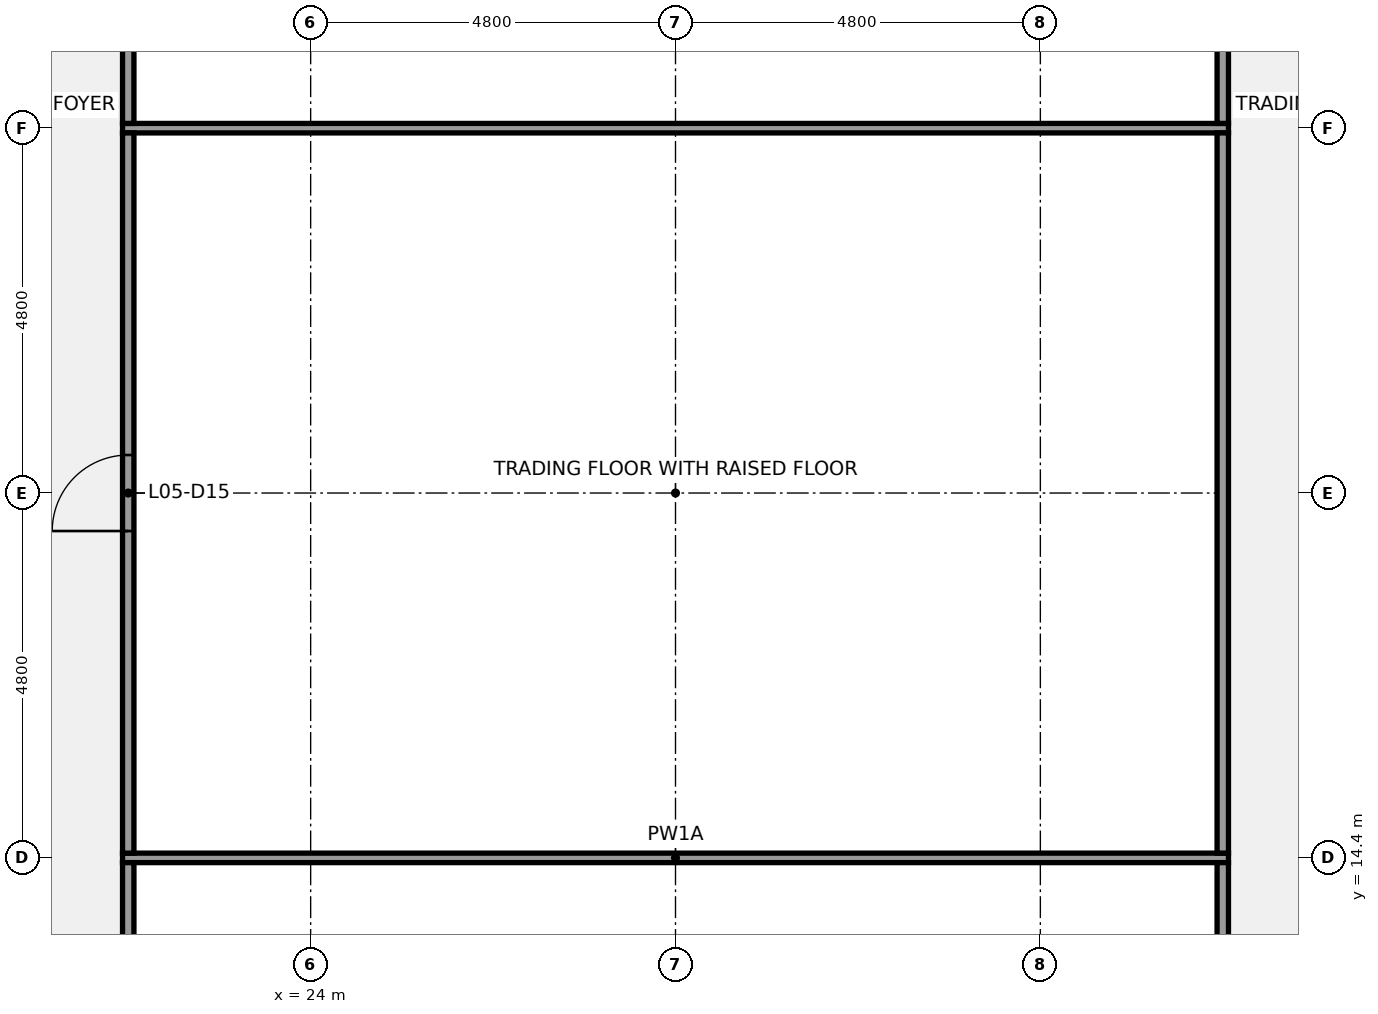
"""IFC4 building model, lengths in metres.
Left out: names, types, materials, properties, quantities, classifications, styles, units other than length and angle.
Written with IfcOpenShell. Run it as: python <this file> out.ifc"""

import sys

from ifc_helpers import new_model, si_unit, direction, frame, frame_2d, origin, place, context, subcontext, project, spatial, rectangle, extrude, element, fill, save


model = new_model("IFC4")
c1 = context("Model", 3, precision=1e-05, world=origin(), true_north=direction((0.0, 1.0)))
c2 = subcontext(c1, "Body", "Model", "MODEL_VIEW")
j1 = project(units=[si_unit("LENGTHUNIT", "METRE"), si_unit("PLANEANGLEUNIT", "RADIAN")], contexts=[c1])
p1 = place(None, origin())
s1 = spatial("IfcSite", under=j1, at=p1, CompositionType="ELEMENT")
p2 = place(p1, origin())
s2 = spatial("IfcBuilding", under=s1, at=p2, CompositionType="ELEMENT")
p3 = place(p2, frame((0.0, 0.0, 30.2)))
s3 = spatial("IfcBuildingStorey", under=s2, at=p3, CompositionType="ELEMENT", Elevation=30.2)
for number, where, z_axis, x_axis in (
    (1, (21.525, 14.4, 0.0), (0.0, 0.0, 1.0), (1.0, 0.0, 0.0)),
    (2, (21.525, 24.0, 0.0), (0.0, 0.0, 1.0), (1.0, 0.0, 0.0)),
):
    element("IfcWall", number, at=place(p3, frame(where, z_axis=z_axis, x_axis=x_axis)), inside=s3, PredefinedType="PARTITIONING", context=c2, shape_type="SweptSolid", body=[
        extrude(rectangle(XDim=14.55, YDim=0.125, at=frame_2d((7.275, 0.0))), origin(), (0.0, 0.0, 1.0), 3.25),
    ])
p4 = place(p3, frame((21.6, 7.275, 0.0), z_axis=(0.0, 0.0, 1.0), x_axis=(0.0, 1.0, 0.0)))
e3 = element("IfcWall", 3, at=p4, inside=s3, PredefinedType="PARTITIONING", context=c2, shape_type="SweptSolid", body=[
    extrude(rectangle(XDim=7.062, YDim=0.15, at=frame_2d((3.531, 0.0))), origin(), (0.0, 0.0, 1.0), 3.25),
])
p5 = place(p3, frame((21.6, 14.462, 0.0), z_axis=(0.0, 0.0, 1.0), x_axis=(0.0, 1.0, 0.0)))
e4 = element("IfcWall", 4, at=p5, inside=s3, PredefinedType="PARTITIONING", context=c2, shape_type="SweptSolid", body=[
    extrude(rectangle(XDim=9.475, YDim=0.15, at=frame_2d((4.738, 0.0))), origin(), (0.0, 0.0, 1.0), 3.25),
])
p6 = place(p5, frame((4.238, 0.0, 0.0)))
e5 = element("IfcOpeningElement", 5, at=p6, cuts=e4, PredefinedType="OPENING", context=c2, shape_type="SweptSolid", body=[
    extrude(rectangle(XDim=1.0, YDim=2.1, at=frame_2d((0.5, 1.05))), frame((0.0, 0.085, 0.0), z_axis=(0.0, -1.0, 0.0), x_axis=(1.0, 0.0, 0.0)), (0.0, 0.0, 1.0), 0.17),
])
p7 = place(p3, frame((21.6, 24.062, 0.0), z_axis=(0.0, 0.0, 1.0), x_axis=(0.0, 1.0, 0.0)))
e6 = element("IfcWall", 6, at=p7, inside=s3, PredefinedType="PARTITIONING", context=c2, shape_type="SweptSolid", body=[
    extrude(rectangle(XDim=9.475, YDim=0.15, at=frame_2d((4.738, 0.0))), origin(), (0.0, 0.0, 1.0), 3.25),
])
p8 = place(p7, frame((4.238, 0.0, 0.0)))
e7 = element("IfcOpeningElement", 7, at=p8, cuts=e6, PredefinedType="OPENING", context=c2, shape_type="SweptSolid", body=[
    extrude(rectangle(XDim=1.0, YDim=2.1, at=frame_2d((0.5, 1.05))), frame((0.0, 0.085, 0.0), z_axis=(0.0, -1.0, 0.0), x_axis=(1.0, 0.0, 0.0)), (0.0, 0.0, 1.0), 0.17),
])
p9 = place(p3, frame((36.0, 7.275, 0.0), z_axis=(0.0, 0.0, 1.0), x_axis=(0.0, 1.0, 0.0)))
e8 = element("IfcWall", 8, at=p9, inside=s3, PredefinedType="PARTITIONING", context=c2, shape_type="SweptSolid", body=[
    extrude(rectangle(XDim=7.062, YDim=0.15, at=frame_2d((3.531, 0.0))), origin(), (0.0, 0.0, 1.0), 3.25),
])
for number, where, z_axis, x_axis in (
    (9, (36.0, 14.462, 0.0), (0.0, 0.0, 1.0), (0.0, 1.0, 0.0)),
    (10, (36.0, 24.062, 0.0), (0.0, 0.0, 1.0), (0.0, 1.0, 0.0)),
):
    element("IfcWall", number, at=place(p3, frame(where, z_axis=z_axis, x_axis=x_axis)), inside=s3, PredefinedType="PARTITIONING", context=c2, shape_type="SweptSolid", body=[
        extrude(rectangle(XDim=9.475, YDim=0.15, at=frame_2d((4.738, 0.0))), origin(), (0.0, 0.0, 1.0), 3.25),
    ])
p10 = place(p6, origin())
e11 = element("IfcDoor", 11, at=p10, inside=s3, OperationType="SINGLE_SWING_LEFT", PredefinedType="DOOR", context=c2, shape_type="SweptSolid", body=[
    extrude(rectangle(XDim=1.0, YDim=2.1, at=frame_2d((0.5, 1.05))), frame((0.0, 0.025, 0.0), z_axis=(0.0, -1.0, 0.0), x_axis=(1.0, 0.0, 0.0)), (0.0, 0.0, 1.0), 0.05),
])
fill(e5, e11)
save(model, sys.argv[1])
